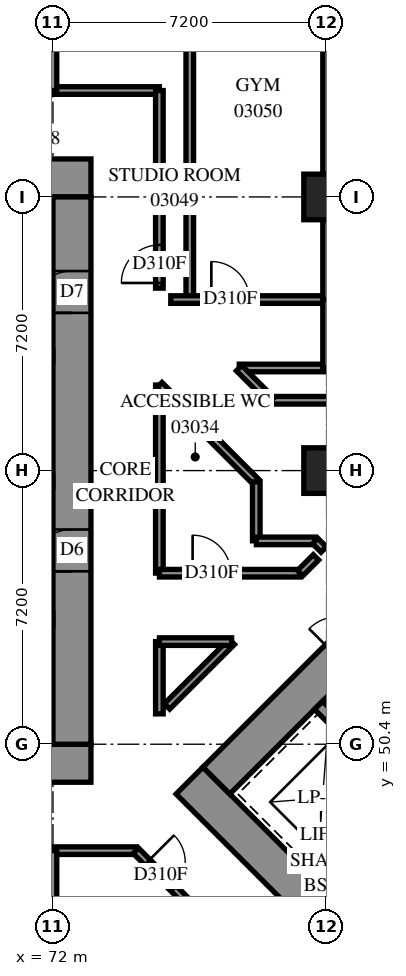
"""IFC4 building model, lengths in metres.
Left out: names, types, materials, properties, quantities, classifications, styles, units other than length and angle.
Written with IfcOpenShell. Run it as: python <this file> out.ifc"""

import sys

from ifc_helpers import new_model, si_unit, direction, frame, frame_2d, origin, origin_2d, place, context, subcontext, project, spatial, rectangle, extrude, element, fill, save


model = new_model("IFC4")
c1 = context("Model", 3, precision=1e-05, world=origin(), true_north=direction((0.0, 1.0)))
c2 = subcontext(c1, "Body", "Model", "MODEL_VIEW")
j1 = project(units=[si_unit("LENGTHUNIT", "METRE"), si_unit("PLANEANGLEUNIT", "RADIAN")], contexts=[c1])
p1 = place(None, origin())
s1 = spatial("IfcSite", under=j1, at=p1, CompositionType="ELEMENT")
p2 = place(p1, origin())
s2 = spatial("IfcBuilding", under=s1, at=p2, CompositionType="ELEMENT")
p3 = place(p2, frame((0.0, 0.0, 14.4)))
s3 = spatial("IfcBuildingStorey", under=s2, at=p3, CompositionType="ELEMENT", Elevation=14.4)
for number, where, z_axis, x_axis in (
    (1, (79.2, 57.6, 0.0), (0.0, 0.0, 1.0), (1.0, 0.0, 0.0)),
    (2, (79.2, 64.8, 0.0), (0.0, 0.0, 1.0), (1.0, 0.0, 0.0)),
):
    element("IfcColumn", number, at=place(p3, frame(where, z_axis=z_axis, x_axis=x_axis)), inside=s3, PredefinedType="COLUMN", context=c2, shape_type="SweptSolid", body=[
        extrude(rectangle(XDim=1.2, YDim=1.2, at=origin_2d()), origin(), (0.0, 0.0, 1.0), 3.8),
    ])
p4 = place(p3, frame((56.6, 49.9, -0.4), z_axis=(0.0, 0.0, 1.0), x_axis=(1.0, 0.0, 0.0)))
e3 = element("IfcWall", 3, at=p4, inside=s3, PredefinedType="SHEAR", context=c2, shape_type="SweptSolid", body=[
    extrude(rectangle(XDim=16.4, YDim=1.0, at=frame_2d((8.2, 0.0))), origin(), (0.0, 0.0, 1.0), 3.5),
])
p5 = place(p3, frame((56.6, 65.3, -0.4), z_axis=(0.0, 0.0, 1.0), x_axis=(1.0, 0.0, 0.0)))
e4 = element("IfcWall", 4, at=p5, inside=s3, PredefinedType="SHEAR", context=c2, shape_type="SweptSolid", body=[
    extrude(rectangle(XDim=16.4, YDim=1.0, at=frame_2d((8.2, 0.0))), origin(), (0.0, 0.0, 1.0), 3.5),
])
p6 = place(p5, frame((11.0, 0.0, 0.4)))
e5 = element("IfcOpeningElement", 5, at=p6, cuts=e4, PredefinedType="OPENING", context=c2, shape_type="SweptSolid", body=[
    extrude(rectangle(XDim=0.8, YDim=2.1, at=frame_2d((0.4, 1.05))), frame((0.0, 0.51, 0.0), z_axis=(0.0, -1.0, 0.0), x_axis=(1.0, 0.0, 0.0)), (0.0, 0.0, 1.0), 1.02),
])
p7 = place(p3, frame((72.5, 50.4, -0.4), z_axis=(0.0, 0.0, 1.0), x_axis=(0.0, 1.0, 0.0)))
e6 = element("IfcWall", 6, at=p7, inside=s3, PredefinedType="SHEAR", context=c2, shape_type="SweptSolid", body=[
    extrude(rectangle(XDim=14.4, YDim=1.0, at=frame_2d((7.2, 0.0))), origin(), (0.0, 0.0, 1.0), 3.5),
])
p8 = place(p7, frame((4.55, 0.0, 0.4)))
e7 = element("IfcOpeningElement", 7, at=p8, cuts=e6, PredefinedType="OPENING", context=c2, shape_type="SweptSolid", body=[
    extrude(rectangle(XDim=1.1, YDim=2.1, at=frame_2d((0.55, 1.05))), frame((0.0, 0.51, 0.0), z_axis=(0.0, -1.0, 0.0), x_axis=(1.0, 0.0, 0.0)), (0.0, 0.0, 1.0), 1.02),
])
p9 = place(p7, frame((11.35, 0.0, 0.4)))
e8 = element("IfcOpeningElement", 8, at=p9, cuts=e6, PredefinedType="OPENING", context=c2, shape_type="SweptSolid", body=[
    extrude(rectangle(XDim=1.1, YDim=2.1, at=frame_2d((0.55, 1.05))), frame((0.0, 0.51, 0.0), z_axis=(0.0, -1.0, 0.0), x_axis=(1.0, 0.0, 0.0)), (0.0, 0.0, 1.0), 1.02),
])
p10 = place(p3, frame((75.594, 49.443, -0.4), z_axis=(0.0, 0.0, 1.0), x_axis=(0.7071037324, -0.70710983, 0.0)))
e9 = element("IfcWall", 9, at=p10, inside=s3, PredefinedType="SHEAR", context=c2, shape_type="SweptSolid", body=[
    extrude(rectangle(XDim=16.4, YDim=1.0, at=frame_2d((8.2, 0.0))), origin(), (0.0, 0.0, 1.0), 3.5),
])
p11 = place(p3, frame((76.301, 49.443, -0.4), z_axis=(0.0, 0.0, 1.0), x_axis=(0.7071067812, 0.7071067812, 0.0)))
e10 = element("IfcWall", 10, at=p11, inside=s3, PredefinedType="SHEAR", context=c2, shape_type="SweptSolid", body=[
    extrude(rectangle(XDim=14.4, YDim=1.0, at=frame_2d((7.2, 0.0))), origin(), (0.0, 0.0, 1.0), 3.5),
])
p12 = place(p11, frame((4.55, 0.0, 0.4)))
e11 = element("IfcOpeningElement", 11, at=p12, cuts=e10, PredefinedType="OPENING", context=c2, shape_type="SweptSolid", body=[
    extrude(rectangle(XDim=1.1, YDim=2.1, at=frame_2d((0.55, 1.05))), frame((0.0, 0.51, 0.0), z_axis=(0.0, -1.0, 0.0), x_axis=(1.0, 0.0, 0.0)), (0.0, 0.0, 1.0), 1.02),
])
p13 = place(p11, frame((11.35, 0.0, 0.4)))
e12 = element("IfcOpeningElement", 12, at=p13, cuts=e10, PredefinedType="OPENING", context=c2, shape_type="SweptSolid", body=[
    extrude(rectangle(XDim=1.1, YDim=2.1, at=frame_2d((0.55, 1.05))), frame((0.0, 0.51, 0.0), z_axis=(0.0, -1.0, 0.0), x_axis=(1.0, 0.0, 0.0)), (0.0, 0.0, 1.0), 1.02),
])
p14 = place(p3, frame((79.2, 46.544, 0.0), z_axis=(0.0, 0.0, 1.0), x_axis=(0.7071219326, 0.7070916295, 0.0)))
e13 = element("IfcWall", 13, at=p14, inside=s3, PredefinedType="SOLIDWALL", context=c2, shape_type="SweptSolid", body=[
    extrude(rectangle(XDim=3.3, YDim=0.3, at=frame_2d((1.65, 0.0))), origin(), (0.0, 0.0, 1.0), 3.8),
])
p15 = place(p3, frame((78.988, 51.423, 0.0), z_axis=(0.0, 0.0, 1.0), x_axis=(0.7071067812, -0.7071067812, 0.0)))
e14 = element("IfcWall", 14, at=p15, inside=s3, PredefinedType="SOLIDWALL", context=c2, shape_type="SweptSolid", body=[
    extrude(rectangle(XDim=14.4, YDim=0.3, at=frame_2d((7.2, 0.0))), origin(), (0.0, 0.0, 1.0), 3.8),
])
p16 = place(p15, frame((1.25, 0.0, 0.0)))
e15 = element("IfcOpeningElement", 15, at=p16, cuts=e14, PredefinedType="OPENING", context=c2, shape_type="SweptSolid", body=[
    extrude(rectangle(XDim=1.1, YDim=2.1, at=frame_2d((0.55, 1.05))), frame((0.0, 0.16, 0.0), z_axis=(0.0, -1.0, 0.0), x_axis=(1.0, 0.0, 0.0)), (0.0, 0.0, 1.0), 0.32),
])
p17 = place(p15, frame((4.85, 0.0, 0.0)))
e16 = element("IfcOpeningElement", 16, at=p17, cuts=e14, PredefinedType="OPENING", context=c2, shape_type="SweptSolid", body=[
    extrude(rectangle(XDim=1.1, YDim=2.1, at=frame_2d((0.55, 1.05))), frame((0.0, 0.16, 0.0), z_axis=(0.0, -1.0, 0.0), x_axis=(1.0, 0.0, 0.0)), (0.0, 0.0, 1.0), 0.32),
])
p18 = place(p15, frame((8.45, 0.0, 0.0)))
e17 = element("IfcOpeningElement", 17, at=p18, cuts=e14, PredefinedType="OPENING", context=c2, shape_type="SweptSolid", body=[
    extrude(rectangle(XDim=1.1, YDim=2.1, at=frame_2d((0.55, 1.05))), frame((0.0, 0.16, 0.0), z_axis=(0.0, -1.0, 0.0), x_axis=(1.0, 0.0, 0.0)), (0.0, 0.0, 1.0), 0.32),
])
p19 = place(p15, frame((12.05, 0.0, 0.0)))
e18 = element("IfcOpeningElement", 18, at=p19, cuts=e14, PredefinedType="OPENING", context=c2, shape_type="SweptSolid", body=[
    extrude(rectangle(XDim=1.1, YDim=2.1, at=frame_2d((0.55, 1.05))), frame((0.0, 0.16, 0.0), z_axis=(0.0, -1.0, 0.0), x_axis=(1.0, 0.0, 0.0)), (0.0, 0.0, 1.0), 0.32),
])
p20 = place(p3, frame((54.8, 67.6, 0.0), z_axis=(0.0, 0.0, 1.0), x_axis=(1.0, 0.0, 0.0)))
e19 = element("IfcWall", 19, at=p20, inside=s3, PredefinedType="PARTITIONING", context=c2, shape_type="SweptSolid", body=[
    extrude(rectangle(XDim=20.0, YDim=0.2, at=frame_2d((10.0, 0.0))), origin(), (0.0, 0.0, 1.0), 3.8),
])
p21 = place(p20, frame((6.662, 0.0, 0.0)))
e20 = element("IfcOpeningElement", 20, at=p21, cuts=e19, PredefinedType="OPENING", context=c2, shape_type="SweptSolid", body=[
    extrude(rectangle(XDim=1.0, YDim=2.1, at=frame_2d((0.5, 1.05))), frame((0.0, 0.11, 0.0), z_axis=(0.0, -1.0, 0.0), x_axis=(1.0, 0.0, 0.0)), (0.0, 0.0, 1.0), 0.22),
])
p22 = place(p20, frame((13.863, 0.0, 0.0)))
e21 = element("IfcOpeningElement", 21, at=p22, cuts=e19, PredefinedType="OPENING", context=c2, shape_type="SweptSolid", body=[
    extrude(rectangle(XDim=1.0, YDim=2.1, at=frame_2d((0.5, 1.05))), frame((0.0, 0.11, 0.0), z_axis=(0.0, -1.0, 0.0), x_axis=(1.0, 0.0, 0.0)), (0.0, 0.0, 1.0), 0.22),
])
p23 = place(p3, frame((54.8, 47.6, 0.0), z_axis=(0.0, 0.0, 1.0), x_axis=(1.0, 0.0, 0.0)))
e22 = element("IfcWall", 22, at=p23, inside=s3, PredefinedType="PARTITIONING", context=c2, shape_type="SweptSolid", body=[
    extrude(rectangle(XDim=19.384, YDim=0.2, at=frame_2d((9.692, 0.0))), origin(), (0.0, 0.0, 1.0), 3.8),
])
p24 = place(p23, frame((8.458, 0.0, 0.0)))
e23 = element("IfcOpeningElement", 23, at=p24, cuts=e22, PredefinedType="OPENING", context=c2, shape_type="SweptSolid", body=[
    extrude(rectangle(XDim=1.0, YDim=2.1, at=frame_2d((0.5, 1.05))), frame((0.0, 0.11, 0.0), z_axis=(0.0, -1.0, 0.0), x_axis=(1.0, 0.0, 0.0)), (0.0, 0.0, 1.0), 0.22),
])
p25 = place(p23, frame((14.107, 0.0, 0.0)))
e24 = element("IfcOpeningElement", 24, at=p25, cuts=e22, PredefinedType="OPENING", context=c2, shape_type="SweptSolid", body=[
    extrude(rectangle(XDim=1.0, YDim=2.1, at=frame_2d((0.5, 1.05))), frame((0.0, 0.11, 0.0), z_axis=(0.0, -1.0, 0.0), x_axis=(1.0, 0.0, 0.0)), (0.0, 0.0, 1.0), 0.22),
])
p26 = place(p3, frame((75.6, 62.1, 0.0), z_axis=(0.0, 0.0, 1.0), x_axis=(0.0, 1.0, 0.0)))
e25 = element("IfcWall", 25, at=p26, inside=s3, PredefinedType="PARTITIONING", context=c2, shape_type="SweptSolid", body=[
    extrude(rectangle(XDim=10.55, YDim=0.2, at=frame_2d((5.275, 0.0))), origin(), (0.0, 0.0, 1.0), 3.8),
])
p27 = place(p3, frame((79.2, 65.4, 0.0), z_axis=(0.0, 0.0, 1.0), x_axis=(0.0, 1.0, 0.0)))
e26 = element("IfcWall", 26, at=p27, inside=s3, PredefinedType="PARTITIONING", context=c2, shape_type="SweptSolid", body=[
    extrude(rectangle(XDim=6.0, YDim=0.2, at=frame_2d((3.0, 0.0))), origin(), (0.0, 0.0, 1.0), 3.8),
])
p28 = place(p3, frame((74.8, 62.4, 0.0), z_axis=(0.0, 0.0, 1.0), x_axis=(0.0, 1.0, 0.0)))
e27 = element("IfcWall", 27, at=p28, inside=s3, PredefinedType="PARTITIONING", context=c2, shape_type="SweptSolid", body=[
    extrude(rectangle(XDim=5.2, YDim=0.2, at=frame_2d((2.6, 0.0))), origin(), (0.0, 0.0, 1.0), 3.8),
])
p29 = place(p28, frame((0.137, 0.0, 0.0)))
e28 = element("IfcOpeningElement", 28, at=p29, cuts=e27, PredefinedType="OPENING", context=c2, shape_type="SweptSolid", body=[
    extrude(rectangle(XDim=1.0, YDim=2.1, at=frame_2d((0.5, 1.05))), frame((0.0, 0.11, 0.0), z_axis=(0.0, -1.0, 0.0), x_axis=(1.0, 0.0, 0.0)), (0.0, 0.0, 1.0), 0.22),
])
p30 = place(p3, frame((74.8, 54.902, 0.0), z_axis=(0.0, 0.0, 1.0), x_axis=(0.0, 1.0, 0.0)))
e29 = element("IfcWall", 29, at=p30, inside=s3, PredefinedType="PARTITIONING", context=c2, shape_type="SweptSolid", body=[
    extrude(rectangle(XDim=4.95, YDim=0.2, at=frame_2d((2.475, 0.0))), origin(), (0.0, 0.0, 1.0), 3.8),
])
p31 = place(p3, frame((74.181, 47.597, 0.0), z_axis=(0.0, 0.0, 1.0), x_axis=(0.7071067812, -0.7071067812, 0.0)))
e30 = element("IfcWall", 30, at=p31, inside=s3, PredefinedType="PARTITIONING", context=c2, shape_type="SweptSolid", body=[
    extrude(rectangle(XDim=4.477, YDim=0.2, at=frame_2d((2.239, 0.0))), origin(), (0.0, 0.0, 1.0), 3.8),
])
p32 = place(p31, frame((0.423, 0.0, 0.0)))
e31 = element("IfcOpeningElement", 31, at=p32, cuts=e30, PredefinedType="OPENING", context=c2, shape_type="SweptSolid", body=[
    extrude(rectangle(XDim=1.0, YDim=2.1, at=frame_2d((0.5, 1.05))), frame((0.0, 0.11, 0.0), z_axis=(0.0, -1.0, 0.0), x_axis=(1.0, 0.0, 0.0)), (0.0, 0.0, 1.0), 0.22),
])
p33 = place(p3, frame((75.1, 62.1, 0.0), z_axis=(0.0, 0.0, 1.0), x_axis=(1.0, 0.0, 0.0)))
e32 = element("IfcWall", 32, at=p33, inside=s3, PredefinedType="PARTITIONING", context=c2, shape_type="SweptSolid", body=[
    extrude(rectangle(XDim=4.1, YDim=0.2, at=frame_2d((2.05, 0.0))), origin(), (0.0, 0.0, 1.0), 3.8),
])
p34 = place(p33, frame((1.067, 0.0, 0.0)))
e33 = element("IfcOpeningElement", 33, at=p34, cuts=e32, PredefinedType="OPENING", context=c2, shape_type="SweptSolid", body=[
    extrude(rectangle(XDim=1.0, YDim=2.1, at=frame_2d((0.5, 1.05))), frame((0.0, 0.11, 0.0), z_axis=(0.0, -1.0, 0.0), x_axis=(1.0, 0.0, 0.0)), (0.0, 0.0, 1.0), 0.22),
])
for number, where, z_axis, x_axis in (
    (34, (72.0, 67.6, 0.0), (0.0, 0.0, 1.0), (0.0, 1.0, 0.0)),
    (35, (72.0, 43.8, 0.0), (0.0, 0.0, 1.0), (0.0, 1.0, 0.0)),
):
    element("IfcWall", number, at=place(p3, frame(where, z_axis=z_axis, x_axis=x_axis)), inside=s3, PredefinedType="PARTITIONING", context=c2, shape_type="SweptSolid", body=[
        extrude(rectangle(XDim=3.8, YDim=0.2, at=frame_2d((1.9, 0.0))), origin(), (0.0, 0.0, 1.0), 3.8),
    ])
p35 = place(p3, frame((74.802, 54.9, 0.0), z_axis=(0.0, 0.0, 1.0), x_axis=(1.0, 0.0, 0.0)))
e36 = element("IfcWall", 36, at=p35, inside=s3, PredefinedType="PARTITIONING", context=c2, shape_type="SweptSolid", body=[
    extrude(rectangle(XDim=3.702, YDim=0.2, at=frame_2d((1.851, 0.0))), origin(), (0.0, 0.0, 1.0), 3.8),
])
p36 = place(p35, frame((0.873, 0.0, 0.0)))
e37 = element("IfcOpeningElement", 37, at=p36, cuts=e36, PredefinedType="OPENING", context=c2, shape_type="SweptSolid", body=[
    extrude(rectangle(XDim=1.0, YDim=2.1, at=frame_2d((0.5, 1.05))), frame((0.0, 0.11, 0.0), z_axis=(0.0, -1.0, 0.0), x_axis=(1.0, 0.0, 0.0)), (0.0, 0.0, 1.0), 0.22),
])
p37 = place(p3, frame((74.799, 59.849, 0.0), z_axis=(0.0, 0.0, 1.0), x_axis=(0.7071067812, -0.7071067812, 0.0)))
e38 = element("IfcWall", 38, at=p37, inside=s3, PredefinedType="PARTITIONING", context=c2, shape_type="SweptSolid", body=[
    extrude(rectangle(XDim=3.603, YDim=0.2, at=frame_2d((1.802, 0.0))), origin(), (0.0, 0.0, 1.0), 3.8),
])
p38 = place(p3, frame((75.001, 51.395, 0.0), z_axis=(0.0, 0.0, 1.0), x_axis=(0.7075218716, 0.7066914469, 0.0)))
e39 = element("IfcWall", 39, at=p38, inside=s3, PredefinedType="PARTITIONING", context=c2, shape_type="SweptSolid", body=[
    extrude(rectangle(XDim=2.408, YDim=0.2, at=frame_2d((1.204, 0.0))), origin(), (0.0, 0.0, 1.0), 3.8),
])
p39 = place(p3, frame((76.902, 60.3, 0.0), z_axis=(0.0, 0.0, 1.0), x_axis=(1.0, 0.0, 0.0)))
e40 = element("IfcWall", 40, at=p39, inside=s3, PredefinedType="PARTITIONING", context=c2, shape_type="SweptSolid", body=[
    extrude(rectangle(XDim=2.298, YDim=0.2, at=frame_2d((1.149, 0.0))), origin(), (0.0, 0.0, 1.0), 3.8),
])
p40 = place(p3, frame((79.2, 62.1, 0.0), z_axis=(0.0, 0.0, 1.0), x_axis=(0.0, 1.0, 0.0)))
e41 = element("IfcWall", 41, at=p40, inside=s3, PredefinedType="PARTITIONING", context=c2, shape_type="SweptSolid", body=[
    extrude(rectangle(XDim=2.1, YDim=0.2, at=frame_2d((1.05, 0.0))), origin(), (0.0, 0.0, 1.0), 3.8),
])
p41 = place(p3, frame((77.75, 59.45, 0.0), z_axis=(0.0, 0.0, 1.0), x_axis=(1.0, 0.0, 0.0)))
e42 = element("IfcWall", 42, at=p41, inside=s3, PredefinedType="PARTITIONING", context=c2, shape_type="SweptSolid", body=[
    extrude(rectangle(XDim=2.05, YDim=0.2, at=frame_2d((1.025, 0.0))), origin(), (0.0, 0.0, 1.0), 3.8),
])
p42 = place(p3, frame((74.8, 51.198, 0.0), z_axis=(0.0, 0.0, 1.0), x_axis=(0.0, 1.0, 0.0)))
e43 = element("IfcWall", 43, at=p42, inside=s3, PredefinedType="PARTITIONING", context=c2, shape_type="SweptSolid", body=[
    extrude(rectangle(XDim=1.902, YDim=0.2, at=frame_2d((0.951, 0.0))), origin(), (0.0, 0.0, 1.0), 3.8),
])
p43 = place(p3, frame((74.802, 53.1, 0.0), z_axis=(0.0, 0.0, 1.0), x_axis=(1.0, 0.0, 0.0)))
e44 = element("IfcWall", 44, at=p43, inside=s3, PredefinedType="PARTITIONING", context=c2, shape_type="SweptSolid", body=[
    extrude(rectangle(XDim=1.9, YDim=0.2, at=frame_2d((0.95, 0.0))), origin(), (0.0, 0.0, 1.0), 3.8),
])
p44 = place(p3, frame((79.2, 60.3, 0.0), z_axis=(0.0, 0.0, 1.0), x_axis=(0.0, 1.0, 0.0)))
e45 = element("IfcWall", 45, at=p44, inside=s3, PredefinedType="PARTITIONING", context=c2, shape_type="SweptSolid", body=[
    extrude(rectangle(XDim=1.8, YDim=0.2, at=frame_2d((0.9, 0.0))), origin(), (0.0, 0.0, 1.0), 3.8),
])
for number, where, z_axis, x_axis in (
    (46, (77.35, 55.752, 0.0), (0.0, 0.0, 1.0), (0.0, 1.0, 0.0)),
    (47, (77.352, 55.75, 0.0), (0.0, 0.0, 1.0), (1.0, 0.0, 0.0)),
):
    element("IfcWall", number, at=place(p3, frame(where, z_axis=z_axis, x_axis=x_axis)), inside=s3, PredefinedType="PARTITIONING", context=c2, shape_type="SweptSolid", body=[
        extrude(rectangle(XDim=1.552, YDim=0.2, at=frame_2d((0.776, 0.0))), origin(), (0.0, 0.0, 1.0), 3.8),
    ])
p45 = place(p3, frame((76.897, 60.295, 0.0), z_axis=(0.0, 0.0, 1.0), x_axis=(0.7071067812, -0.7071067812, 0.0)))
e48 = element("IfcWall", 48, at=p45, inside=s3, PredefinedType="PARTITIONING", context=c2, shape_type="SweptSolid", body=[
    extrude(rectangle(XDim=1.199, YDim=0.2, at=frame_2d((0.6, 0.0))), origin(), (0.0, 0.0, 1.0), 3.8),
])
p46 = place(p3, frame((78.505, 54.901, 0.0), z_axis=(0.0, 0.0, 1.0), x_axis=(0.7071067812, 0.7071067812, 0.0)))
e49 = element("IfcWall", 49, at=p46, inside=s3, PredefinedType="PARTITIONING", context=c2, shape_type="SweptSolid", body=[
    extrude(rectangle(XDim=0.588, YDim=0.2, at=frame_2d((0.294, 0.0))), origin(), (0.0, 0.0, 1.0), 3.8),
])
p47 = place(p3, frame((78.901, 55.747, 0.0), z_axis=(0.0, 0.0, 1.0), x_axis=(0.7071067812, -0.7071067812, 0.0)))
e50 = element("IfcWall", 50, at=p47, inside=s3, PredefinedType="PARTITIONING", context=c2, shape_type="SweptSolid", body=[
    extrude(rectangle(XDim=0.317, YDim=0.2, at=frame_2d((0.158, 0.0))), origin(), (0.0, 0.0, 1.0), 3.8),
])
p48 = place(p8, origin())
e51 = element("IfcDoor", 51, at=p48, inside=s3, OperationType="DOUBLE_DOOR_SINGLE_SWING", PredefinedType="DOOR", context=c2, shape_type="SweptSolid", body=[
    extrude(rectangle(XDim=1.1, YDim=2.1, at=frame_2d((0.55, 1.05))), frame((0.0, 0.025, 0.0), z_axis=(0.0, -1.0, 0.0), x_axis=(1.0, 0.0, 0.0)), (0.0, 0.0, 1.0), 0.05),
])
fill(e7, e51)
p49 = place(p9, origin())
e52 = element("IfcDoor", 52, at=p49, inside=s3, OperationType="SINGLE_SWING_RIGHT", PredefinedType="DOOR", context=c2, shape_type="SweptSolid", body=[
    extrude(rectangle(XDim=1.1, YDim=2.1, at=frame_2d((0.55, 1.05))), frame((0.0, 0.025, 0.0), z_axis=(0.0, -1.0, 0.0), x_axis=(1.0, 0.0, 0.0)), (0.0, 0.0, 1.0), 0.05),
])
fill(e8, e52)
p50 = place(p32, origin())
e53 = element("IfcDoor", 53, at=p50, inside=s3, OperationType="SINGLE_SWING_LEFT", PredefinedType="DOOR", context=c2, shape_type="SweptSolid", body=[
    extrude(rectangle(XDim=1.0, YDim=2.1, at=frame_2d((0.5, 1.05))), frame((0.0, 0.025, 0.0), z_axis=(0.0, -1.0, 0.0), x_axis=(1.0, 0.0, 0.0)), (0.0, 0.0, 1.0), 0.05),
])
fill(e31, e53)
p51 = place(p36, origin())
e54 = element("IfcDoor", 54, at=p51, inside=s3, OperationType="SINGLE_SWING_LEFT", PredefinedType="DOOR", context=c2, shape_type="SweptSolid", body=[
    extrude(rectangle(XDim=1.0, YDim=2.1, at=frame_2d((0.5, 1.05))), frame((0.0, 0.025, 0.0), z_axis=(0.0, -1.0, 0.0), x_axis=(1.0, 0.0, 0.0)), (0.0, 0.0, 1.0), 0.05),
])
fill(e37, e54)
p52 = place(p29, origin())
e55 = element("IfcDoor", 55, at=p52, inside=s3, OperationType="SINGLE_SWING_RIGHT", PredefinedType="DOOR", context=c2, shape_type="SweptSolid", body=[
    extrude(rectangle(XDim=1.0, YDim=2.1, at=frame_2d((0.5, 1.05))), frame((0.0, 0.025, 0.0), z_axis=(0.0, -1.0, 0.0), x_axis=(1.0, 0.0, 0.0)), (0.0, 0.0, 1.0), 0.05),
])
fill(e28, e55)
p53 = place(p34, origin())
e56 = element("IfcDoor", 56, at=p53, inside=s3, OperationType="SINGLE_SWING_LEFT", PredefinedType="DOOR", context=c2, shape_type="SweptSolid", body=[
    extrude(rectangle(XDim=1.0, YDim=2.1, at=frame_2d((0.5, 1.05))), frame((0.0, 0.025, 0.0), z_axis=(0.0, -1.0, 0.0), x_axis=(1.0, 0.0, 0.0)), (0.0, 0.0, 1.0), 0.05),
])
fill(e33, e56)
save(model, sys.argv[1])
